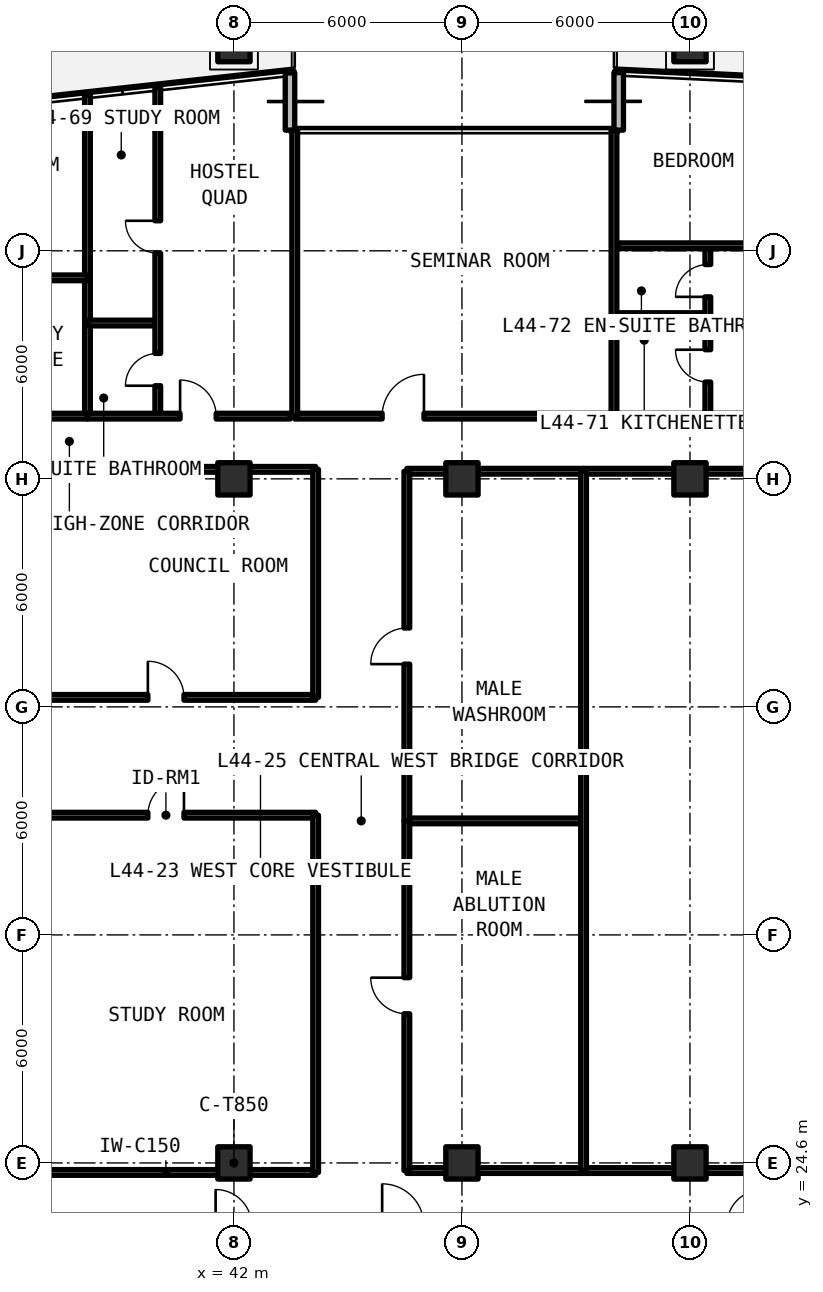
"""IFC4 building model, lengths in metres.
Left out: names, types, materials, properties, quantities, classifications, styles, units other than length and angle.
Written with IfcOpenShell. Run it as: python <this file> out.ifc"""

import sys

from ifc_helpers import new_model, si_unit, direction, frame, frame_2d, origin, origin_2d, place, context, subcontext, project, spatial, rectangle, extrude, element, fill, save


model = new_model("IFC4")
c1 = context("Model", 3, precision=1e-05, world=origin(), true_north=direction((0.0, 1.0)))
c2 = subcontext(c1, "Body", "Model", "MODEL_VIEW")
j1 = project(units=[si_unit("LENGTHUNIT", "METRE"), si_unit("PLANEANGLEUNIT", "RADIAN")], contexts=[c1])
p1 = place(None, origin())
s1 = spatial("IfcSite", under=j1, at=p1, CompositionType="ELEMENT")
p2 = place(p1, origin())
s2 = spatial("IfcBuilding", under=s1, at=p2, CompositionType="ELEMENT")
p3 = place(p2, frame((0.0, 0.0, 158.4)))
s3 = spatial("IfcBuildingStorey", under=s2, at=p3, CompositionType="ELEMENT", Elevation=158.4)
for number, where, z_axis, x_axis in (
    (1, (42.0, 24.6, 0.0), (0.0, 0.0, 1.0), (1.0, 0.0, 0.0)),
    (2, (42.0, 42.6, 0.0), (0.0, 0.0, 1.0), (1.0, 0.0, 0.0)),
    (3, (48.0, 24.6, 0.0), (0.0, 0.0, 1.0), (1.0, 0.0, 0.0)),
    (4, (48.0, 42.6, 0.0), (0.0, 0.0, 1.0), (1.0, 0.0, 0.0)),
    (5, (54.0, 24.6, 0.0), (0.0, 0.0, 1.0), (1.0, 0.0, 0.0)),
    (6, (54.0, 42.6, 0.0), (0.0, 0.0, 1.0), (1.0, 0.0, 0.0)),
    (7, (42.0, 54.0, 0.0), (0.0, 0.0, 1.0), (1.0, 0.0, 0.0)),
    (8, (54.0, 54.0, 0.0), (0.0, 0.0, 1.0), (1.0, 0.0, 0.0)),
):
    element("IfcColumn", number, at=place(p3, frame(where, z_axis=z_axis, x_axis=x_axis)), inside=s3, PredefinedType="COLUMN", context=c2, shape_type="SweptSolid", body=[
        extrude(rectangle(XDim=0.85, YDim=0.85, at=origin_2d()), origin(), (0.0, 0.0, 1.0), 3.63),
    ])
p4 = place(p3, frame((52.125, 53.289, 0.0), z_axis=(0.0, 0.0, 1.0), x_axis=(0.0, -1.0, 0.0)))
e9 = element("IfcWall", 9, at=p4, inside=s3, PredefinedType="SOLIDWALL", context=c2, shape_type="SweptSolid", body=[
    extrude(rectangle(XDim=1.514, YDim=0.25, at=frame_2d((0.757, 0.0))), origin(), (0.0, 0.0, 1.0), 3.41),
])
p5 = place(p3, frame((43.475, 51.775, 0.0), z_axis=(0.0, 0.0, 1.0), x_axis=(0.0, 1.0, 0.0)))
e10 = element("IfcWall", 10, at=p5, inside=s3, PredefinedType="SOLIDWALL", context=c2, shape_type="SweptSolid", body=[
    extrude(rectangle(XDim=1.506, YDim=0.25, at=frame_2d((0.753, 0.0))), origin(), (0.0, 0.0, 1.0), 3.41),
])
p6 = place(p3, frame((36.27, 24.35, 0.0), z_axis=(0.0, 0.0, 1.0), x_axis=(1.0, 0.0, 0.0)))
e11 = element("IfcWall", 11, at=p6, inside=s3, PredefinedType="SOLIDWALL", context=c2, shape_type="SweptSolid", body=[
    extrude(rectangle(XDim=7.88, YDim=0.15, at=frame_2d((3.94, 0.0))), origin(), (0.0, 0.0, 1.0), 2.63),
])
p7 = place(p3, frame((36.27, 33.75, 0.0), z_axis=(0.0, 0.0, 1.0), x_axis=(1.0, 0.0, 0.0)))
e12 = element("IfcWall", 12, at=p7, inside=s3, PredefinedType="SOLIDWALL", context=c2, shape_type="SweptSolid", body=[
    extrude(rectangle(XDim=7.88, YDim=0.15, at=frame_2d((3.94, 0.0))), origin(), (0.0, 0.0, 1.0), 2.63),
])
p8 = place(p7, frame((3.465, 0.0, 0.0)))
e13 = element("IfcOpeningElement", 13, at=p8, cuts=e12, PredefinedType="OPENING", context=c2, shape_type="SweptSolid", body=[
    extrude(rectangle(XDim=0.95, YDim=2.15, at=frame_2d((0.475, 1.075))), frame((0.0, 0.085, 0.0), z_axis=(0.0, -1.0, 0.0), x_axis=(1.0, 0.0, 0.0)), (0.0, 0.0, 1.0), 0.17),
])
p9 = place(p3, frame((44.15, 24.35, 0.0), z_axis=(0.0, 0.0, 1.0), x_axis=(0.0, 1.0, 0.0)))
e14 = element("IfcWall", 14, at=p9, inside=s3, PredefinedType="SOLIDWALL", context=c2, shape_type="SweptSolid", body=[
    extrude(rectangle(XDim=9.4, YDim=0.15, at=frame_2d((4.7, 0.0))), origin(), (0.0, 0.0, 1.0), 2.63),
])
p10 = place(p3, frame((36.27, 36.85, 0.0), z_axis=(0.0, 0.0, 1.0), x_axis=(1.0, 0.0, 0.0)))
e15 = element("IfcWall", 15, at=p10, inside=s3, PredefinedType="SOLIDWALL", context=c2, shape_type="SweptSolid", body=[
    extrude(rectangle(XDim=7.88, YDim=0.15, at=frame_2d((3.94, 0.0))), origin(), (0.0, 0.0, 1.0), 2.63),
])
p11 = place(p10, frame((3.465, 0.0, 0.0)))
e16 = element("IfcOpeningElement", 16, at=p11, cuts=e15, PredefinedType="OPENING", context=c2, shape_type="SweptSolid", body=[
    extrude(rectangle(XDim=0.95, YDim=2.15, at=frame_2d((0.475, 1.075))), frame((0.0, 0.085, 0.0), z_axis=(0.0, -1.0, 0.0), x_axis=(1.0, 0.0, 0.0)), (0.0, 0.0, 1.0), 0.17),
])
p12 = place(p3, frame((36.27, 42.85, 0.0), z_axis=(0.0, 0.0, 1.0), x_axis=(1.0, 0.0, 0.0)))
e17 = element("IfcWall", 17, at=p12, inside=s3, PredefinedType="SOLIDWALL", context=c2, shape_type="SweptSolid", body=[
    extrude(rectangle(XDim=7.88, YDim=0.15, at=frame_2d((3.94, 0.0))), origin(), (0.0, 0.0, 1.0), 2.63),
])
p13 = place(p3, frame((44.15, 36.85, 0.0), z_axis=(0.0, 0.0, 1.0), x_axis=(0.0, 1.0, 0.0)))
e18 = element("IfcWall", 18, at=p13, inside=s3, PredefinedType="SOLIDWALL", context=c2, shape_type="SweptSolid", body=[
    extrude(rectangle(XDim=6.0, YDim=0.15, at=frame_2d((3.0, 0.0))), origin(), (0.0, 0.0, 1.0), 2.63),
])
for number, where, z_axis, x_axis in (
    (19, (46.55, 24.4, 0.0), (0.0, 0.0, 1.0), (1.0, 0.0, 0.0)),
    (20, (46.55, 33.6, 0.0), (0.0, 0.0, 1.0), (1.0, 0.0, 0.0)),
):
    element("IfcWall", number, at=place(p3, frame(where, z_axis=z_axis, x_axis=x_axis)), inside=s3, PredefinedType="SOLIDWALL", context=c2, shape_type="SweptSolid", body=[
        extrude(rectangle(XDim=4.65, YDim=0.15, at=frame_2d((2.325, 0.0))), origin(), (0.0, 0.0, 1.0), 2.63),
    ])
p14 = place(p3, frame((46.55, 24.4, 0.0), z_axis=(0.0, 0.0, 1.0), x_axis=(0.0, 1.0, 0.0)))
e21 = element("IfcWall", 21, at=p14, inside=s3, PredefinedType="SOLIDWALL", context=c2, shape_type="SweptSolid", body=[
    extrude(rectangle(XDim=9.2, YDim=0.15, at=frame_2d((4.6, 0.0))), origin(), (0.0, 0.0, 1.0), 2.63),
])
p15 = place(p14, frame((4.125, 0.0, 0.0)))
e22 = element("IfcOpeningElement", 22, at=p15, cuts=e21, PredefinedType="OPENING", context=c2, shape_type="SweptSolid", body=[
    extrude(rectangle(XDim=0.95, YDim=2.15, at=frame_2d((0.475, 1.075))), frame((0.0, 0.085, 0.0), z_axis=(0.0, -1.0, 0.0), x_axis=(1.0, 0.0, 0.0)), (0.0, 0.0, 1.0), 0.17),
])
p16 = place(p3, frame((46.55, 42.8, 0.0), z_axis=(0.0, 0.0, 1.0), x_axis=(1.0, 0.0, 0.0)))
e23 = element("IfcWall", 23, at=p16, inside=s3, PredefinedType="SOLIDWALL", context=c2, shape_type="SweptSolid", body=[
    extrude(rectangle(XDim=4.65, YDim=0.15, at=frame_2d((2.325, 0.0))), origin(), (0.0, 0.0, 1.0), 2.63),
])
p17 = place(p3, frame((46.55, 33.6, 0.0), z_axis=(0.0, 0.0, 1.0), x_axis=(0.0, 1.0, 0.0)))
e24 = element("IfcWall", 24, at=p17, inside=s3, PredefinedType="SOLIDWALL", context=c2, shape_type="SweptSolid", body=[
    extrude(rectangle(XDim=9.2, YDim=0.15, at=frame_2d((4.6, 0.0))), origin(), (0.0, 0.0, 1.0), 2.63),
])
p18 = place(p17, frame((4.125, 0.0, 0.0)))
e25 = element("IfcOpeningElement", 25, at=p18, cuts=e24, PredefinedType="OPENING", context=c2, shape_type="SweptSolid", body=[
    extrude(rectangle(XDim=0.95, YDim=2.15, at=frame_2d((0.475, 1.075))), frame((0.0, 0.085, 0.0), z_axis=(0.0, -1.0, 0.0), x_axis=(1.0, 0.0, 0.0)), (0.0, 0.0, 1.0), 0.17),
])
p19 = place(p3, frame((51.2, 24.4, 0.0), z_axis=(0.0, 0.0, 1.0), x_axis=(1.0, 0.0, 0.0)))
e26 = element("IfcWall", 26, at=p19, inside=s3, PredefinedType="SOLIDWALL", context=c2, shape_type="SweptSolid", body=[
    extrude(rectangle(XDim=11.6, YDim=0.15, at=frame_2d((5.8, 0.0))), origin(), (0.0, 0.0, 1.0), 2.63),
])
p20 = place(p19, frame((5.1, 0.0, 0.0)))
e27 = element("IfcOpeningElement", 27, at=p20, cuts=e26, PredefinedType="OPENING", context=c2, shape_type="SweptSolid", body=[
    extrude(rectangle(XDim=1.4, YDim=2.15, at=frame_2d((0.7, 1.075))), frame((0.0, 0.085, 0.0), z_axis=(0.0, -1.0, 0.0), x_axis=(1.0, 0.0, 0.0)), (0.0, 0.0, 1.0), 0.17),
])
p21 = place(p3, frame((51.2, 42.8, 0.0), z_axis=(0.0, 0.0, 1.0), x_axis=(1.0, 0.0, 0.0)))
e28 = element("IfcWall", 28, at=p21, inside=s3, PredefinedType="SOLIDWALL", context=c2, shape_type="SweptSolid", body=[
    extrude(rectangle(XDim=11.6, YDim=0.15, at=frame_2d((5.8, 0.0))), origin(), (0.0, 0.0, 1.0), 2.63),
])
p22 = place(p3, frame((51.2, 24.4, 0.0), z_axis=(0.0, 0.0, 1.0), x_axis=(0.0, 1.0, 0.0)))
e29 = element("IfcWall", 29, at=p22, inside=s3, PredefinedType="SOLIDWALL", context=c2, shape_type="SweptSolid", body=[
    extrude(rectangle(XDim=18.4, YDim=0.15, at=frame_2d((9.2, 0.0))), origin(), (0.0, 0.0, 1.0), 2.63),
])
p23 = place(p3, frame((43.6, 44.25, 0.0), z_axis=(0.0, 0.0, 1.0), x_axis=(1.0, 0.0, 0.0)))
e30 = element("IfcWall", 30, at=p23, inside=s3, PredefinedType="SOLIDWALL", context=c2, shape_type="SweptSolid", body=[
    extrude(rectangle(XDim=8.4, YDim=0.15, at=frame_2d((4.2, 0.0))), origin(), (0.0, 0.0, 1.0), 2.63),
])
p24 = place(p23, frame((2.3, 0.0, 0.0)))
e31 = element("IfcOpeningElement", 31, at=p24, cuts=e30, PredefinedType="OPENING", context=c2, shape_type="SweptSolid", body=[
    extrude(rectangle(XDim=1.1, YDim=2.15, at=frame_2d((0.55, 1.075))), frame((0.0, 0.085, 0.0), z_axis=(0.0, -1.0, 0.0), x_axis=(1.0, 0.0, 0.0)), (0.0, 0.0, 1.0), 0.17),
])
for number, where, z_axis, x_axis in (
    (32, (43.6, 44.25, 0.0), (0.0, 0.0, 1.0), (0.0, 1.0, 0.0)),
    (33, (52.0, 44.25, 0.0), (0.0, 0.0, 1.0), (0.0, 1.0, 0.0)),
):
    element("IfcWall", number, at=place(p3, frame(where, z_axis=z_axis, x_axis=x_axis)), inside=s3, PredefinedType="SOLIDWALL", context=c2, shape_type="SweptSolid", body=[
        extrude(rectangle(XDim=7.525, YDim=0.15, at=frame_2d((3.762, 0.0))), origin(), (0.0, 0.0, 1.0), 2.63),
    ])
p25 = place(p3, frame((38.146, 44.25, 0.0), z_axis=(0.0, 0.0, 1.0), x_axis=(0.0, 1.0, 0.0)))
e34 = element("IfcWall", 34, at=p25, inside=s3, PredefinedType="SOLIDWALL", context=c2, shape_type="SweptSolid", body=[
    extrude(rectangle(XDim=8.445, YDim=0.15, at=frame_2d((4.222, 0.0))), origin(), (0.0, 0.0, 1.0), 2.63),
])
p26 = place(p3, frame((31.24, 47.889, 0.0), z_axis=(0.0, 0.0, 1.0), x_axis=(1.0, 0.0, 0.0)))
e35 = element("IfcWall", 35, at=p26, inside=s3, PredefinedType="PARTITIONING", context=c2, shape_type="SweptSolid", body=[
    extrude(rectangle(XDim=6.906, YDim=0.15, at=frame_2d((3.453, 0.0))), origin(), (0.0, 0.0, 1.0), 2.63),
])
p27 = place(p26, frame((4.242, 0.0, 0.0)))
e36 = element("IfcOpeningElement", 36, at=p27, cuts=e35, PredefinedType="OPENING", context=c2, shape_type="SweptSolid", body=[
    extrude(rectangle(XDim=0.85, YDim=2.1, at=frame_2d((0.425, 1.05))), frame((0.0, 0.085, 0.0), z_axis=(0.0, -1.0, 0.0), x_axis=(1.0, 0.0, 0.0)), (0.0, 0.0, 1.0), 0.17),
])
p28 = place(p3, frame((31.24, 44.25, 0.0), z_axis=(0.0, 0.0, 1.0), x_axis=(1.0, 0.0, 0.0)))
e37 = element("IfcWall", 37, at=p28, inside=s3, PredefinedType="SOLIDWALL", context=c2, shape_type="SweptSolid", body=[
    extrude(rectangle(XDim=6.906, YDim=0.15, at=frame_2d((3.453, 0.0))), origin(), (0.0, 0.0, 1.0), 2.63),
])
p29 = place(p28, frame((4.192, 0.0, 0.0)))
e38 = element("IfcOpeningElement", 38, at=p29, cuts=e37, PredefinedType="OPENING", context=c2, shape_type="SweptSolid", body=[
    extrude(rectangle(XDim=0.95, YDim=2.15, at=frame_2d((0.475, 1.075))), frame((0.0, 0.085, 0.0), z_axis=(0.0, -1.0, 0.0), x_axis=(1.0, 0.0, 0.0)), (0.0, 0.0, 1.0), 0.17),
])
p30 = place(p3, frame((38.146, 46.7, 0.0), z_axis=(0.0, 0.0, 1.0), x_axis=(1.0, 0.0, 0.0)))
e39 = element("IfcWall", 39, at=p30, inside=s3, PredefinedType="PARTITIONING", context=c2, shape_type="SweptSolid", body=[
    extrude(rectangle(XDim=1.85, YDim=0.15, at=frame_2d((0.925, 0.0))), origin(), (0.0, 0.0, 1.0), 2.63),
])
p31 = place(p3, frame((39.996, 44.25, 0.0), z_axis=(0.0, 0.0, 1.0), x_axis=(0.0, 1.0, 0.0)))
e40 = element("IfcWall", 40, at=p31, inside=s3, PredefinedType="PARTITIONING", context=c2, shape_type="SweptSolid", body=[
    extrude(rectangle(XDim=8.648, YDim=0.15, at=frame_2d((4.324, 0.0))), origin(), (0.0, 0.0, 1.0), 2.63),
])
p32 = place(p31, frame((0.8, 0.0, 0.0)))
e41 = element("IfcOpeningElement", 41, at=p32, cuts=e40, PredefinedType="OPENING", context=c2, shape_type="SweptSolid", body=[
    extrude(rectangle(XDim=0.85, YDim=2.1, at=frame_2d((0.425, 1.05))), frame((0.0, 0.085, 0.0), z_axis=(0.0, -1.0, 0.0), x_axis=(1.0, 0.0, 0.0)), (0.0, 0.0, 1.0), 0.17),
])
p33 = place(p31, frame((4.29, 0.0, 0.0)))
e42 = element("IfcOpeningElement", 42, at=p33, cuts=e40, PredefinedType="OPENING", context=c2, shape_type="SweptSolid", body=[
    extrude(rectangle(XDim=0.85, YDim=2.1, at=frame_2d((0.425, 1.05))), frame((0.0, 0.085, 0.0), z_axis=(0.0, -1.0, 0.0), x_axis=(1.0, 0.0, 0.0)), (0.0, 0.0, 1.0), 0.17),
])
p34 = place(p3, frame((38.146, 44.25, 0.0), z_axis=(0.0, 0.0, 1.0), x_axis=(1.0, 0.0, 0.0)))
e43 = element("IfcWall", 43, at=p34, inside=s3, PredefinedType="SOLIDWALL", context=c2, shape_type="SweptSolid", body=[
    extrude(rectangle(XDim=5.334, YDim=0.15, at=frame_2d((2.667, 0.0))), origin(), (0.0, 0.0, 1.0), 2.63),
])
p35 = place(p34, frame((2.437, 0.0, 0.0)))
e44 = element("IfcOpeningElement", 44, at=p35, cuts=e43, PredefinedType="OPENING", context=c2, shape_type="SweptSolid", body=[
    extrude(rectangle(XDim=0.95, YDim=2.15, at=frame_2d((0.475, 1.075))), frame((0.0, 0.085, 0.0), z_axis=(0.0, -1.0, 0.0), x_axis=(1.0, 0.0, 0.0)), (0.0, 0.0, 1.0), 0.17),
])
p36 = place(p3, frame((52.12, 46.895, 0.0), z_axis=(0.0, 0.0, 1.0), x_axis=(1.0, 0.0, 0.0)))
e45 = element("IfcWall", 45, at=p36, inside=s3, PredefinedType="PARTITIONING", context=c2, shape_type="SweptSolid", body=[
    extrude(rectangle(XDim=2.35, YDim=0.15, at=frame_2d((1.175, 0.0))), origin(), (0.0, 0.0, 1.0), 2.63),
])
p37 = place(p3, frame((54.47, 44.25, 0.0), z_axis=(0.0, 0.0, 1.0), x_axis=(0.0, 1.0, 0.0)))
e46 = element("IfcWall", 46, at=p37, inside=s3, PredefinedType="PARTITIONING", context=c2, shape_type="SweptSolid", body=[
    extrude(rectangle(XDim=4.483, YDim=0.15, at=frame_2d((2.241, 0.0))), origin(), (0.0, 0.0, 1.0), 2.63),
])
p38 = place(p37, frame((0.897, 0.0, 0.0)))
e47 = element("IfcOpeningElement", 47, at=p38, cuts=e46, PredefinedType="OPENING", context=c2, shape_type="SweptSolid", body=[
    extrude(rectangle(XDim=0.85, YDim=2.1, at=frame_2d((0.425, 1.05))), frame((0.0, 0.085, 0.0), z_axis=(0.0, -1.0, 0.0), x_axis=(1.0, 0.0, 0.0)), (0.0, 0.0, 1.0), 0.17),
])
p39 = place(p37, frame((3.139, 0.0, 0.0)))
e48 = element("IfcOpeningElement", 48, at=p39, cuts=e46, PredefinedType="OPENING", context=c2, shape_type="SweptSolid", body=[
    extrude(rectangle(XDim=0.85, YDim=2.1, at=frame_2d((0.425, 1.05))), frame((0.0, 0.085, 0.0), z_axis=(0.0, -1.0, 0.0), x_axis=(1.0, 0.0, 0.0)), (0.0, 0.0, 1.0), 0.17),
])
p40 = place(p3, frame((52.12, 48.733, 0.0), z_axis=(0.0, 0.0, 1.0), x_axis=(1.0, 0.0, 0.0)))
e49 = element("IfcWall", 49, at=p40, inside=s3, PredefinedType="PARTITIONING", context=c2, shape_type="SweptSolid", body=[
    extrude(rectangle(XDim=13.964, YDim=0.15, at=frame_2d((6.982, 0.0))), origin(), (0.0, 0.0, 1.0), 2.63),
])
p41 = place(p40, frame((4.381, 0.0, 0.0)))
e50 = element("IfcOpeningElement", 50, at=p41, cuts=e49, PredefinedType="OPENING", context=c2, shape_type="SweptSolid", body=[
    extrude(rectangle(XDim=0.85, YDim=2.1, at=frame_2d((0.425, 1.05))), frame((0.0, 0.085, 0.0), z_axis=(0.0, -1.0, 0.0), x_axis=(1.0, 0.0, 0.0)), (0.0, 0.0, 1.0), 0.17),
])
p42 = place(p40, frame((10.188, 0.0, 0.0)))
e51 = element("IfcOpeningElement", 51, at=p42, cuts=e49, PredefinedType="OPENING", context=c2, shape_type="SweptSolid", body=[
    extrude(rectangle(XDim=0.85, YDim=2.1, at=frame_2d((0.425, 1.05))), frame((0.0, 0.085, 0.0), z_axis=(0.0, -1.0, 0.0), x_axis=(1.0, 0.0, 0.0)), (0.0, 0.0, 1.0), 0.17),
])
p43 = place(p3, frame((52.12, 44.25, 0.0), z_axis=(0.0, 0.0, 1.0), x_axis=(1.0, 0.0, 0.0)))
e52 = element("IfcWall", 52, at=p43, inside=s3, PredefinedType="SOLIDWALL", context=c2, shape_type="SweptSolid", body=[
    extrude(rectangle(XDim=13.964, YDim=0.15, at=frame_2d((6.982, 0.0))), origin(), (0.0, 0.0, 1.0), 2.63),
])
p44 = place(p43, frame((8.772, 0.0, 0.0)))
e53 = element("IfcOpeningElement", 53, at=p44, cuts=e52, PredefinedType="OPENING", context=c2, shape_type="SweptSolid", body=[
    extrude(rectangle(XDim=0.95, YDim=2.15, at=frame_2d((0.475, 1.075))), frame((0.0, 0.085, 0.0), z_axis=(0.0, -1.0, 0.0), x_axis=(1.0, 0.0, 0.0)), (0.0, 0.0, 1.0), 0.17),
])
p45 = place(p8, origin())
e54 = element("IfcDoor", 54, at=p45, inside=s3, OperationType="SINGLE_SWING_RIGHT", PredefinedType="DOOR", context=c2, shape_type="SweptSolid", body=[
    extrude(rectangle(XDim=0.95, YDim=2.15, at=frame_2d((0.475, 1.075))), frame((0.0, 0.025, 0.0), z_axis=(0.0, -1.0, 0.0), x_axis=(1.0, 0.0, 0.0)), (0.0, 0.0, 1.0), 0.05),
])
fill(e13, e54)
p46 = place(p11, origin())
e55 = element("IfcDoor", 55, at=p46, inside=s3, OperationType="SINGLE_SWING_LEFT", PredefinedType="DOOR", context=c2, shape_type="SweptSolid", body=[
    extrude(rectangle(XDim=0.95, YDim=2.15, at=frame_2d((0.475, 1.075))), frame((0.0, 0.025, 0.0), z_axis=(0.0, -1.0, 0.0), x_axis=(1.0, 0.0, 0.0)), (0.0, 0.0, 1.0), 0.05),
])
fill(e16, e55)
p47 = place(p15, origin())
e56 = element("IfcDoor", 56, at=p47, inside=s3, OperationType="SINGLE_SWING_RIGHT", PredefinedType="DOOR", context=c2, shape_type="SweptSolid", body=[
    extrude(rectangle(XDim=0.95, YDim=2.15, at=frame_2d((0.475, 1.075))), frame((0.0, 0.025, 0.0), z_axis=(0.0, -1.0, 0.0), x_axis=(1.0, 0.0, 0.0)), (0.0, 0.0, 1.0), 0.05),
])
fill(e22, e56)
p48 = place(p18, origin())
e57 = element("IfcDoor", 57, at=p48, inside=s3, OperationType="SINGLE_SWING_LEFT", PredefinedType="DOOR", context=c2, shape_type="SweptSolid", body=[
    extrude(rectangle(XDim=0.95, YDim=2.15, at=frame_2d((0.475, 1.075))), frame((0.0, 0.025, 0.0), z_axis=(0.0, -1.0, 0.0), x_axis=(1.0, 0.0, 0.0)), (0.0, 0.0, 1.0), 0.05),
])
fill(e25, e57)
p49 = place(p24, origin())
e58 = element("IfcDoor", 58, at=p49, inside=s3, OperationType="SINGLE_SWING_RIGHT", PredefinedType="DOOR", context=c2, shape_type="SweptSolid", body=[
    extrude(rectangle(XDim=1.1, YDim=2.15, at=frame_2d((0.55, 1.075))), frame((0.0, 0.025, 0.0), z_axis=(0.0, -1.0, 0.0), x_axis=(1.0, 0.0, 0.0)), (0.0, 0.0, 1.0), 0.05),
])
fill(e31, e58)
p50 = place(p32, origin())
e59 = element("IfcDoor", 59, at=p50, inside=s3, OperationType="SINGLE_SWING_LEFT", PredefinedType="DOOR", context=c2, shape_type="SweptSolid", body=[
    extrude(rectangle(XDim=0.85, YDim=2.1, at=frame_2d((0.425, 1.05))), frame((0.0, 0.025, 0.0), z_axis=(0.0, -1.0, 0.0), x_axis=(1.0, 0.0, 0.0)), (0.0, 0.0, 1.0), 0.05),
])
fill(e41, e59)
p51 = place(p33, origin())
e60 = element("IfcDoor", 60, at=p51, inside=s3, OperationType="SINGLE_SWING_RIGHT", PredefinedType="DOOR", context=c2, shape_type="SweptSolid", body=[
    extrude(rectangle(XDim=0.85, YDim=2.1, at=frame_2d((0.425, 1.05))), frame((0.0, 0.025, 0.0), z_axis=(0.0, -1.0, 0.0), x_axis=(1.0, 0.0, 0.0)), (0.0, 0.0, 1.0), 0.05),
])
fill(e42, e60)
p52 = place(p35, origin())
e61 = element("IfcDoor", 61, at=p52, inside=s3, OperationType="SINGLE_SWING_LEFT", PredefinedType="DOOR", context=c2, shape_type="SweptSolid", body=[
    extrude(rectangle(XDim=0.95, YDim=2.15, at=frame_2d((0.475, 1.075))), frame((0.0, 0.025, 0.0), z_axis=(0.0, -1.0, 0.0), x_axis=(1.0, 0.0, 0.0)), (0.0, 0.0, 1.0), 0.05),
])
fill(e44, e61)
p53 = place(p38, origin())
e62 = element("IfcDoor", 62, at=p53, inside=s3, OperationType="SINGLE_SWING_RIGHT", PredefinedType="DOOR", context=c2, shape_type="SweptSolid", body=[
    extrude(rectangle(XDim=0.85, YDim=2.1, at=frame_2d((0.425, 1.05))), frame((0.0, 0.025, 0.0), z_axis=(0.0, -1.0, 0.0), x_axis=(1.0, 0.0, 0.0)), (0.0, 0.0, 1.0), 0.05),
])
fill(e47, e62)
p54 = place(p39, origin())
e63 = element("IfcDoor", 63, at=p54, inside=s3, OperationType="SINGLE_SWING_LEFT", PredefinedType="DOOR", context=c2, shape_type="SweptSolid", body=[
    extrude(rectangle(XDim=0.85, YDim=2.1, at=frame_2d((0.425, 1.05))), frame((0.0, 0.025, 0.0), z_axis=(0.0, -1.0, 0.0), x_axis=(1.0, 0.0, 0.0)), (0.0, 0.0, 1.0), 0.05),
])
fill(e48, e63)
save(model, sys.argv[1])
